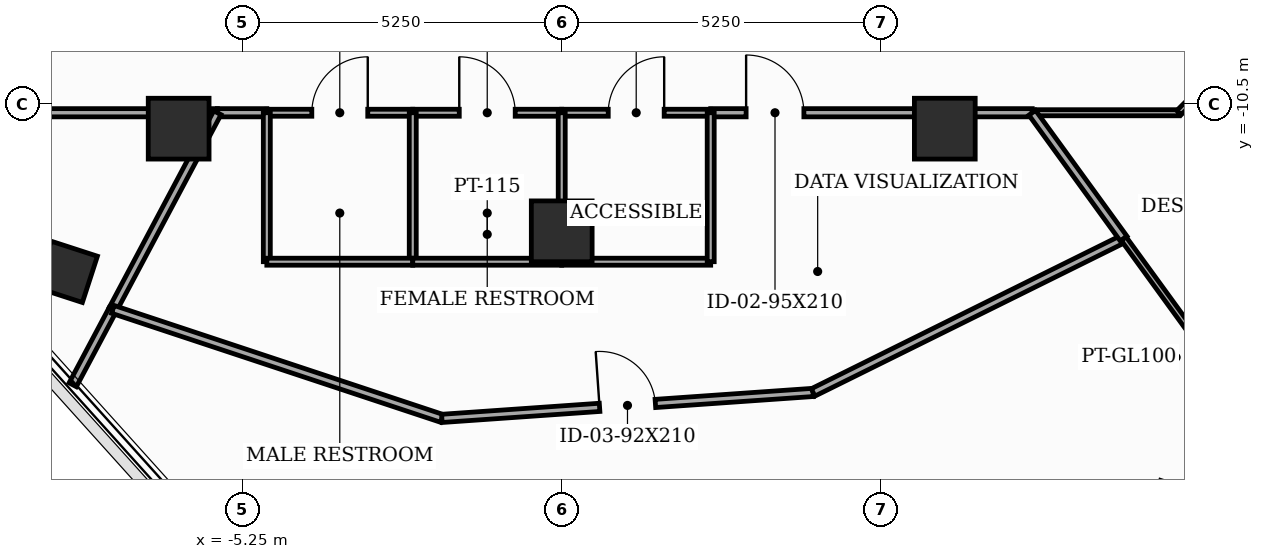
"""IFC4 building model, lengths in metres.
Left out: names, types, materials, properties, quantities, classifications, styles, units other than length and angle.
Written with IfcOpenShell. Run it as: python <this file> out.ifc"""

import sys

from ifc_helpers import new_model, si_unit, direction, frame, frame_2d, origin, origin_2d, place, context, subcontext, project, spatial, rectangle, extrude, element, fill, save


model = new_model("IFC4")
c1 = context("Model", 3, precision=1e-05, world=origin(), true_north=direction((0.0, 1.0)))
c2 = subcontext(c1, "Body", "Model", "MODEL_VIEW")
j1 = project(units=[si_unit("LENGTHUNIT", "METRE"), si_unit("PLANEANGLEUNIT", "RADIAN")], contexts=[c1])
p1 = place(None, origin())
s1 = spatial("IfcSite", under=j1, at=p1, CompositionType="ELEMENT")
p2 = place(p1, origin())
s2 = spatial("IfcBuilding", under=s1, at=p2, CompositionType="ELEMENT")
p3 = place(p2, frame((0.0, 0.0, 301.7)))
s3 = spatial("IfcBuildingStorey", under=s2, at=p3, CompositionType="ELEMENT", Elevation=301.7)
for number, where, z_axis, x_axis in (
    (1, (-6.3, -10.912, 0.0), (0.0, 0.0, 1.0), (1.0, 0.0, 0.0)),
    (2, (0.0, -12.6, 0.0), (0.0, 0.0, 1.0), (1.0, 0.0, 0.0)),
    (3, (6.3, -10.912, 0.0), (0.0, 0.0, 1.0), (1.0, 0.0, 0.0)),
):
    element("IfcColumn", number, at=place(p3, frame(where, z_axis=z_axis, x_axis=x_axis)), inside=s3, PredefinedType="COLUMN", context=c2, shape_type="SweptSolid", body=[
        extrude(rectangle(XDim=1.0, YDim=1.0, at=origin_2d()), origin(), (0.0, 0.0, 1.0), 3.7),
    ])
p4 = place(p3, frame((-8.14, -13.266, 0.0), z_axis=(0.0, 0.0, 1.0), x_axis=(0.309016994375, 0.951056516295, 0.0)))
e4 = element("IfcColumn", 4, at=p4, inside=s3, PredefinedType="COLUMN", context=c2, shape_type="SweptSolid", body=[
    extrude(rectangle(XDim=0.8, YDim=0.8, at=origin_2d()), origin(), (0.0, 0.0, 1.0), 3.7),
])
p5 = place(p3, frame((-10.15, -10.65, 0.0), z_axis=(0.0, 0.0, 1.0), x_axis=(1.0, 0.0, 0.0)))
e5 = element("IfcWall", 5, at=p5, inside=s3, PredefinedType="PARTITIONING", context=c2, shape_type="SweptSolid", body=[
    extrude(rectangle(XDim=4.487, YDim=0.135, at=frame_2d((2.243, 0.0))), origin(), (0.0, 0.0, 1.0), 2.885),
])
p6 = place(p3, frame((-4.85, -10.65, 0.0), z_axis=(0.0, 0.0, 1.0), x_axis=(1.0, 0.0, 0.0)))
e6 = element("IfcWall", 6, at=p6, inside=s3, PredefinedType="PARTITIONING", context=c2, shape_type="SweptSolid", body=[
    extrude(rectangle(XDim=2.4, YDim=0.115, at=frame_2d((1.2, 0.0))), origin(), (0.0, 0.0, 1.0), 3.5),
])
p7 = place(p6, frame((0.74, 0.0, 0.0)))
e7 = element("IfcOpeningElement", 7, at=p7, cuts=e6, PredefinedType="OPENING", context=c2, shape_type="SweptSolid", body=[
    extrude(rectangle(XDim=0.92, YDim=2.1, at=frame_2d((0.46, 1.05))), frame((0.0, 0.067, 0.0), z_axis=(0.0, -1.0, 0.0), x_axis=(1.0, 0.0, 0.0)), (0.0, 0.0, 1.0), 0.135),
])
p8 = place(p3, frame((-2.45, -10.65, 0.0), z_axis=(0.0, 0.0, 1.0), x_axis=(1.0, 0.0, 0.0)))
e8 = element("IfcWall", 8, at=p8, inside=s3, PredefinedType="PARTITIONING", context=c2, shape_type="SweptSolid", body=[
    extrude(rectangle(XDim=2.45, YDim=0.115, at=frame_2d((1.225, 0.0))), origin(), (0.0, 0.0, 1.0), 2.885),
])
p9 = place(p8, frame((0.765, 0.0, 0.0)))
e9 = element("IfcOpeningElement", 9, at=p9, cuts=e8, PredefinedType="OPENING", context=c2, shape_type="SweptSolid", body=[
    extrude(rectangle(XDim=0.92, YDim=2.1, at=frame_2d((0.46, 1.05))), frame((0.0, 0.067, 0.0), z_axis=(0.0, -1.0, 0.0), x_axis=(1.0, 0.0, 0.0)), (0.0, 0.0, 1.0), 0.135),
])
p10 = place(p3, frame((0.0, -10.65, 0.0), z_axis=(0.0, 0.0, 1.0), x_axis=(1.0, 0.0, 0.0)))
e10 = element("IfcWall", 10, at=p10, inside=s3, PredefinedType="PARTITIONING", context=c2, shape_type="SweptSolid", body=[
    extrude(rectangle(XDim=2.45, YDim=0.115, at=frame_2d((1.225, 0.0))), origin(), (0.0, 0.0, 1.0), 3.5),
])
p11 = place(p10, frame((0.765, 0.0, 0.0)))
e11 = element("IfcOpeningElement", 11, at=p11, cuts=e10, PredefinedType="OPENING", context=c2, shape_type="SweptSolid", body=[
    extrude(rectangle(XDim=0.92, YDim=2.1, at=frame_2d((0.46, 1.05))), frame((0.0, 0.067, 0.0), z_axis=(0.0, -1.0, 0.0), x_axis=(1.0, 0.0, 0.0)), (0.0, 0.0, 1.0), 0.135),
])
p12 = place(p3, frame((-5.663, -10.65, 0.0), z_axis=(0.0, 0.0, 1.0), x_axis=(1.0, 0.0, 0.0)))
e12 = element("IfcWall", 12, at=p12, inside=s3, PredefinedType="PARTITIONING", context=c2, shape_type="SweptSolid", body=[
    extrude(rectangle(XDim=0.813, YDim=0.135, at=frame_2d((0.406, 0.0))), origin(), (0.0, 0.0, 1.0), 3.5),
])
p13 = place(p3, frame((2.45, -10.65, 0.0), z_axis=(0.0, 0.0, 1.0), x_axis=(1.0, 0.0, 0.0)))
e13 = element("IfcWall", 13, at=p13, inside=s3, PredefinedType="PARTITIONING", context=c2, shape_type="SweptSolid", body=[
    extrude(rectangle(XDim=5.288, YDim=0.135, at=frame_2d((2.644, 0.0))), origin(), (0.0, 0.0, 1.0), 2.885),
])
p14 = place(p13, frame((0.583, 0.0, 0.0)))
e14 = element("IfcOpeningElement", 14, at=p14, cuts=e13, PredefinedType="OPENING", context=c2, shape_type="SweptSolid", body=[
    extrude(rectangle(XDim=0.95, YDim=2.1, at=frame_2d((0.475, 1.05))), frame((0.0, 0.077, 0.0), z_axis=(0.0, -1.0, 0.0), x_axis=(1.0, 0.0, 0.0)), (0.0, 0.0, 1.0), 0.155),
])
p15 = place(p3, frame((7.738, -10.65, 0.0), z_axis=(0.0, 0.0, 1.0), x_axis=(1.0, 0.0, 0.0)))
e15 = element("IfcWall", 15, at=p15, inside=s3, PredefinedType="MOVABLE", context=c2, shape_type="SweptSolid", body=[
    extrude(rectangle(XDim=2.412, YDim=0.1, at=frame_2d((1.206, 0.0))), origin(), (0.0, 0.0, 1.0), 3.5),
])
p16 = place(p3, frame((10.15, -10.65, 0.0), z_axis=(0.0, 0.0, 1.0), x_axis=(0.707106781187, 0.707106781187, 0.0)))
e16 = element("IfcWall", 16, at=p16, inside=s3, PredefinedType="MOVABLE", context=c2, shape_type="SweptSolid", body=[
    extrude(rectangle(XDim=0.707, YDim=0.1, at=frame_2d((0.354, 0.0))), origin(), (0.0, 0.0, 1.0), 3.5),
])
p17 = place(p3, frame((-7.382, -13.884, 0.0), z_axis=(0.0, 0.0, 1.0), x_axis=(0.469338791783, 0.88301817565, 0.0)))
e17 = element("IfcWall", 17, at=p17, inside=s3, PredefinedType="PARTITIONING", context=c2, shape_type="SweptSolid", body=[
    extrude(rectangle(XDim=3.663, YDim=0.135, at=frame_2d((1.831, 0.0))), origin(), (0.0, 0.0, 1.0), 2.885),
])
p18 = place(p3, frame((-8.042, -15.124, 0.0), z_axis=(0.0, 0.0, 1.0), x_axis=(0.469595679185, 0.882881587808, 0.0)))
e18 = element("IfcWall", 18, at=p18, inside=s3, PredefinedType="PARTITIONING", context=c2, shape_type="SweptSolid", body=[
    extrude(rectangle(XDim=1.405, YDim=0.135, at=frame_2d((0.702, 0.0))), origin(), (0.0, 0.0, 1.0), 3.035),
])
for number, where, z_axis, x_axis in (
    (19, (-2.45, -13.1, 0.0), (0.0, 0.0, 1.0), (0.0, 1.0, 0.0)),
    (20, (-4.85, -10.65, 0.0), (0.0, 0.0, 1.0), (0.0, -1.0, 0.0)),
):
    element("IfcWall", number, at=place(p3, frame(where, z_axis=z_axis, x_axis=x_axis)), inside=s3, PredefinedType="PARTITIONING", context=c2, shape_type="SweptSolid", body=[
        extrude(rectangle(XDim=2.45, YDim=0.115, at=frame_2d((1.225, 0.0))), origin(), (0.0, 0.0, 1.0), 2.885),
    ])
p19 = place(p3, frame((-4.85, -13.1, 0.0), z_axis=(0.0, 0.0, 1.0), x_axis=(1.0, 0.0, 0.0)))
e21 = element("IfcWall", 21, at=p19, inside=s3, PredefinedType="PARTITIONING", context=c2, shape_type="SweptSolid", body=[
    extrude(rectangle(XDim=2.4, YDim=0.115, at=frame_2d((1.2, 0.0))), origin(), (0.0, 0.0, 1.0), 3.5),
])
p20 = place(p3, frame((0.0, -13.1, 0.0), z_axis=(0.0, 0.0, 1.0), x_axis=(0.0, 1.0, 0.0)))
e22 = element("IfcWall", 22, at=p20, inside=s3, PredefinedType="PARTITIONING", context=c2, shape_type="SweptSolid", body=[
    extrude(rectangle(XDim=2.45, YDim=0.115, at=frame_2d((1.225, 0.0))), origin(), (0.0, 0.0, 1.0), 2.885),
])
for number, where, z_axis, x_axis in (
    (23, (-2.45, -13.1, 0.0), (0.0, 0.0, 1.0), (1.0, 0.0, 0.0)),
    (24, (0.0, -13.1, 0.0), (0.0, 0.0, 1.0), (1.0, 0.0, 0.0)),
):
    element("IfcWall", number, at=place(p3, frame(where, z_axis=z_axis, x_axis=x_axis)), inside=s3, PredefinedType="PARTITIONING", context=c2, shape_type="SweptSolid", body=[
        extrude(rectangle(XDim=2.45, YDim=0.115, at=frame_2d((1.225, 0.0))), origin(), (0.0, 0.0, 1.0), 3.035),
    ])
p21 = place(p3, frame((2.45, -13.1, 0.0), z_axis=(0.0, 0.0, 1.0), x_axis=(0.0, 1.0, 0.0)))
e25 = element("IfcWall", 25, at=p21, inside=s3, PredefinedType="PARTITIONING", context=c2, shape_type="SweptSolid", body=[
    extrude(rectangle(XDim=2.45, YDim=0.115, at=frame_2d((1.225, 0.0))), origin(), (0.0, 0.0, 1.0), 2.885),
])
p22 = place(p3, frame((-7.382, -13.884, 0.0), z_axis=(0.0, 0.0, 1.0), x_axis=(0.949247116003, -0.314531258795, 0.0)))
e26 = element("IfcWall", 26, at=p22, inside=s3, PredefinedType="PARTITIONING", context=c2, shape_type="SweptSolid", body=[
    extrude(rectangle(XDim=5.7, YDim=0.135, at=frame_2d((2.85, 0.0))), origin(), (0.0, 0.0, 1.0), 3.035),
])
p23 = place(p3, frame((-1.971, -15.677, 0.0), z_axis=(0.0, 0.0, 1.0), x_axis=(0.997562911572, 0.069772755832, 0.0)))
e27 = element("IfcWall", 27, at=p23, inside=s3, PredefinedType="PARTITIONING", context=c2, shape_type="SweptSolid", body=[
    extrude(rectangle(XDim=6.12, YDim=0.135, at=frame_2d((3.06, 0.0))), origin(), (0.0, 0.0, 1.0), 3.035),
])
p24 = place(p23, frame((2.6, 0.0, 0.0)))
e28 = element("IfcOpeningElement", 28, at=p24, cuts=e27, PredefinedType="OPENING", context=c2, shape_type="SweptSolid", body=[
    extrude(rectangle(XDim=0.92, YDim=2.1, at=frame_2d((0.46, 1.05))), frame((0.0, 0.077, 0.0), z_axis=(0.0, -1.0, 0.0), x_axis=(1.0, 0.0, 0.0)), (0.0, 0.0, 1.0), 0.155),
])
p25 = place(p3, frame((4.134, -15.25, 0.0), z_axis=(0.0, 0.0, 1.0), x_axis=(0.896167979159, 0.443714945804, 0.0)))
e29 = element("IfcWall", 29, at=p25, inside=s3, PredefinedType="PARTITIONING", context=c2, shape_type="SweptSolid", body=[
    extrude(rectangle(XDim=5.7, YDim=0.135, at=frame_2d((2.85, 0.0))), origin(), (0.0, 0.0, 1.0), 3.035),
])
p26 = place(p3, frame((9.242, -12.721, 0.0), z_axis=(0.0, 0.0, 1.0), x_axis=(-0.58758169089, 0.80916485127, 0.0)))
e30 = element("IfcWall", 30, at=p26, inside=s3, PredefinedType="PARTITIONING", context=c2, shape_type="SweptSolid", body=[
    extrude(rectangle(XDim=2.56, YDim=0.135, at=frame_2d((1.28, 0.0))), origin(), (0.0, 0.0, 1.0), 3.5),
])
p27 = place(p3, frame((11.695, -16.096, 0.0), z_axis=(0.0, 0.0, 1.0), x_axis=(-0.587938546927, 0.808905597111, 0.0)))
e31 = element("IfcWall", 31, at=p27, inside=s3, PredefinedType="MOVABLE", context=c2, shape_type="SweptSolid", body=[
    extrude(rectangle(XDim=4.172, YDim=0.1, at=frame_2d((2.086, 0.0))), origin(), (0.0, 0.0, 1.0), 3.035),
])
p28 = place(p7, origin())
e32 = element("IfcDoor", 32, at=p28, inside=s3, OperationType="SINGLE_SWING_RIGHT", PredefinedType="DOOR", context=c2, shape_type="SweptSolid", body=[
    extrude(rectangle(XDim=0.92, YDim=2.1, at=frame_2d((0.46, 1.05))), frame((0.0, 0.025, 0.0), z_axis=(0.0, -1.0, 0.0), x_axis=(1.0, 0.0, 0.0)), (0.0, 0.0, 1.0), 0.05),
])
fill(e7, e32)
p29 = place(p9, origin())
e33 = element("IfcDoor", 33, at=p29, inside=s3, OperationType="SINGLE_SWING_LEFT", PredefinedType="DOOR", context=c2, shape_type="SweptSolid", body=[
    extrude(rectangle(XDim=0.92, YDim=2.1, at=frame_2d((0.46, 1.05))), frame((0.0, 0.025, 0.0), z_axis=(0.0, -1.0, 0.0), x_axis=(1.0, 0.0, 0.0)), (0.0, 0.0, 1.0), 0.05),
])
fill(e9, e33)
p30 = place(p11, origin())
e34 = element("IfcDoor", 34, at=p30, inside=s3, OperationType="SINGLE_SWING_RIGHT", PredefinedType="DOOR", context=c2, shape_type="SweptSolid", body=[
    extrude(rectangle(XDim=0.92, YDim=2.1, at=frame_2d((0.46, 1.05))), frame((0.0, 0.025, 0.0), z_axis=(0.0, -1.0, 0.0), x_axis=(1.0, 0.0, 0.0)), (0.0, 0.0, 1.0), 0.05),
])
fill(e11, e34)
p31 = place(p14, origin())
e35 = element("IfcDoor", 35, at=p31, inside=s3, OperationType="SINGLE_SWING_LEFT", PredefinedType="DOOR", context=c2, shape_type="SweptSolid", body=[
    extrude(rectangle(XDim=0.95, YDim=2.1, at=frame_2d((0.475, 1.05))), frame((0.0, 0.025, 0.0), z_axis=(0.0, -1.0, 0.0), x_axis=(1.0, 0.0, 0.0)), (0.0, 0.0, 1.0), 0.05),
])
fill(e14, e35)
p32 = place(p24, origin())
e36 = element("IfcDoor", 36, at=p32, inside=s3, OperationType="SINGLE_SWING_LEFT", PredefinedType="DOOR", context=c2, shape_type="SweptSolid", body=[
    extrude(rectangle(XDim=0.92, YDim=2.1, at=frame_2d((0.46, 1.05))), frame((0.0, 0.025, 0.0), z_axis=(0.0, -1.0, 0.0), x_axis=(1.0, 0.0, 0.0)), (0.0, 0.0, 1.0), 0.05),
])
fill(e28, e36)
save(model, sys.argv[1])
